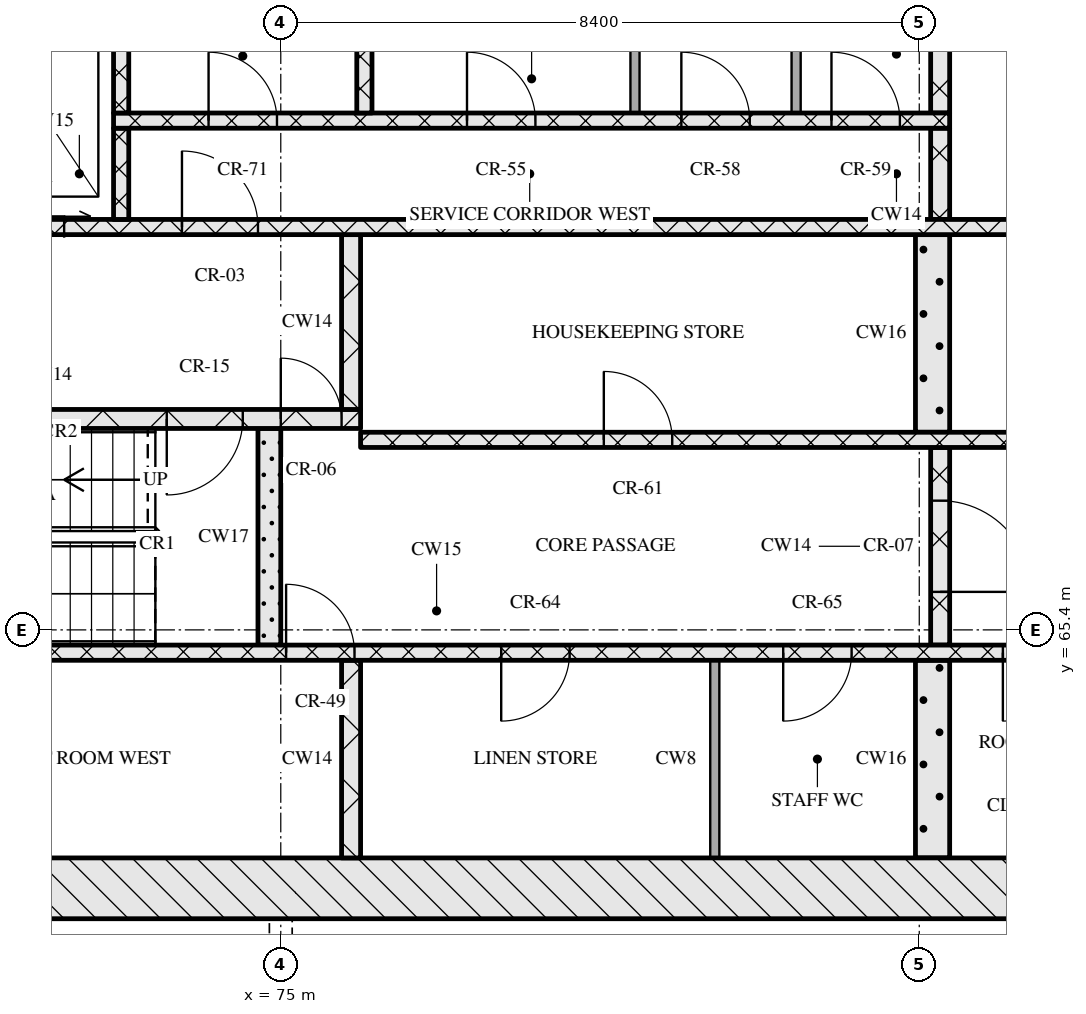
"""IFC4 building model, lengths in metres.
Left out: names, types, materials, properties, quantities, classifications, styles, units other than length and angle.
Written with IfcOpenShell. Run it as: python <this file> out.ifc"""

import sys

from ifc_helpers import new_model, si_unit, direction, frame, frame_2d, origin, place, context, subcontext, project, spatial, rectangle, extrude, element, fill, save


model = new_model("IFC4")
c1 = context("Model", 3, precision=1e-05, world=origin(), true_north=direction((0.0, 1.0)))
c2 = subcontext(c1, "Body", "Model", "MODEL_VIEW")
j1 = project(units=[si_unit("LENGTHUNIT", "METRE"), si_unit("PLANEANGLEUNIT", "RADIAN")], contexts=[c1])
p1 = place(None, origin())
s1 = spatial("IfcSite", under=j1, at=p1, CompositionType="ELEMENT")
p2 = place(p1, origin())
s2 = spatial("IfcBuilding", under=s1, at=p2, CompositionType="ELEMENT")
p3 = place(p2, frame((0.0, 0.0, 158.25)))
s3 = spatial("IfcBuildingStorey", under=s2, at=p3, CompositionType="ELEMENT", Elevation=158.25)
p4 = place(p3, frame((67.0, 62.0, 0.0), z_axis=(0.0, 0.0, 1.0), x_axis=(1.0, 0.0, 0.0)))
e1 = element("IfcWall", 1, at=p4, inside=s3, PredefinedType="SOLIDWALL", context=c2, shape_type="SweptSolid", body=[
    extrude(rectangle(XDim=41.2, YDim=0.8, at=frame_2d((20.6, 0.0))), origin(), (0.0, 0.0, 1.0), 3.32),
])
p5 = place(p4, frame((20.95, 0.0, 0.0)))
e2 = element("IfcOpeningElement", 2, at=p5, cuts=e1, PredefinedType="OPENING", context=c2, shape_type="SweptSolid", body=[
    extrude(rectangle(XDim=1.8, YDim=2.1, at=frame_2d((0.9, 1.05))), frame((0.0, 0.41, 0.0), z_axis=(0.0, -1.0, 0.0), x_axis=(1.0, 0.0, 0.0)), (0.0, 0.0, 1.0), 0.82),
])
p6 = place(p3, frame((75.925, 62.4, 0.0), z_axis=(0.0, 0.0, 1.0), x_axis=(0.0, 1.0, 0.0)))
e3 = element("IfcWall", 3, at=p6, inside=s3, PredefinedType="SOLIDWALL", context=c2, shape_type="SweptSolid", body=[
    extrude(rectangle(XDim=2.6, YDim=0.25, at=frame_2d((1.3, 0.0))), origin(), (0.0, 0.0, 1.0), 3.32),
])
p7 = place(p3, frame((80.71, 62.4, 0.0), z_axis=(0.0, 0.0, 1.0), x_axis=(0.0, 1.0, 0.0)))
e4 = element("IfcWall", 4, at=p7, inside=s3, PredefinedType="PARTITIONING", context=c2, shape_type="SweptSolid", body=[
    extrude(rectangle(XDim=2.6, YDim=0.12, at=frame_2d((1.3, 0.0))), origin(), (0.0, 0.0, 1.0), 3.32),
])
p8 = place(p3, frame((83.575, 62.4, 0.0), z_axis=(0.0, 0.0, 1.0), x_axis=(0.0, 1.0, 0.0)))
e5 = element("IfcWall", 5, at=p8, inside=s3, PredefinedType="SOLIDWALL", context=c2, shape_type="SweptSolid", body=[
    extrude(rectangle(XDim=2.6, YDim=0.45, at=frame_2d((1.3, 0.0))), origin(), (0.0, 0.0, 1.0), 3.32),
])
p9 = place(p3, frame((67.8, 65.1, 0.0), z_axis=(0.0, 0.0, 1.0), x_axis=(1.0, 0.0, 0.0)))
e6 = element("IfcWall", 6, at=p9, inside=s3, PredefinedType="SOLIDWALL", context=c2, shape_type="SweptSolid", body=[
    extrude(rectangle(XDim=18.5, YDim=0.2, at=frame_2d((9.25, 0.0))), origin(), (0.0, 0.0, 1.0), 3.32),
])
p10 = place(p9, frame((7.27, 0.0, 0.0)))
e7 = element("IfcOpeningElement", 7, at=p10, cuts=e6, PredefinedType="OPENING", context=c2, shape_type="SweptSolid", body=[
    extrude(rectangle(XDim=0.9, YDim=2.1, at=frame_2d((0.45, 1.05))), frame((0.0, 0.11, 0.0), z_axis=(0.0, -1.0, 0.0), x_axis=(1.0, 0.0, 0.0)), (0.0, 0.0, 1.0), 0.22),
])
p11 = place(p9, frame((10.1, 0.0, 0.0)))
e8 = element("IfcOpeningElement", 8, at=p11, cuts=e6, PredefinedType="OPENING", context=c2, shape_type="SweptSolid", body=[
    extrude(rectangle(XDim=0.9, YDim=2.1, at=frame_2d((0.45, 1.05))), frame((0.0, 0.11, 0.0), z_axis=(0.0, -1.0, 0.0), x_axis=(1.0, 0.0, 0.0)), (0.0, 0.0, 1.0), 0.22),
])
p12 = place(p9, frame((13.81, 0.0, 0.0)))
e9 = element("IfcOpeningElement", 9, at=p12, cuts=e6, PredefinedType="OPENING", context=c2, shape_type="SweptSolid", body=[
    extrude(rectangle(XDim=0.9, YDim=2.1, at=frame_2d((0.45, 1.05))), frame((0.0, 0.11, 0.0), z_axis=(0.0, -1.0, 0.0), x_axis=(1.0, 0.0, 0.0)), (0.0, 0.0, 1.0), 0.22),
])
p13 = place(p9, frame((16.7, 0.0, 0.0)))
e10 = element("IfcOpeningElement", 10, at=p13, cuts=e6, PredefinedType="OPENING", context=c2, shape_type="SweptSolid", body=[
    extrude(rectangle(XDim=0.9, YDim=2.1, at=frame_2d((0.45, 1.05))), frame((0.0, 0.11, 0.0), z_axis=(0.0, -1.0, 0.0), x_axis=(1.0, 0.0, 0.0)), (0.0, 0.0, 1.0), 0.22),
])
p14 = place(p3, frame((74.85, 65.2, 0.0), z_axis=(0.0, 0.0, 1.0), x_axis=(0.0, 1.0, 0.0)))
e11 = element("IfcWall", 11, at=p14, inside=s3, PredefinedType="SOLIDWALL", context=c2, shape_type="SweptSolid", body=[
    extrude(rectangle(XDim=2.85, YDim=0.3, at=frame_2d((1.425, 0.0))), origin(), (0.0, 0.0, 1.0), 3.32),
])
p15 = place(p3, frame((83.675, 65.2, 0.0), z_axis=(0.0, 0.0, 1.0), x_axis=(0.0, 1.0, 0.0)))
e12 = element("IfcWall", 12, at=p15, inside=s3, PredefinedType="SOLIDWALL", context=c2, shape_type="SweptSolid", body=[
    extrude(rectangle(XDim=2.6, YDim=0.25, at=frame_2d((1.3, 0.0))), origin(), (0.0, 0.0, 1.0), 3.32),
])
p16 = place(p15, frame((0.7, 0.0, 0.0)))
e13 = element("IfcOpeningElement", 13, at=p16, cuts=e12, PredefinedType="OPENING", context=c2, shape_type="SweptSolid", body=[
    extrude(rectangle(XDim=1.2, YDim=2.1, at=frame_2d((0.6, 1.05))), frame((0.0, 0.135, 0.0), z_axis=(0.0, -1.0, 0.0), x_axis=(1.0, 0.0, 0.0)), (0.0, 0.0, 1.0), 0.27),
])
p17 = place(p3, frame((76.05, 67.9, 0.0), z_axis=(0.0, 0.0, 1.0), x_axis=(1.0, 0.0, 0.0)))
e14 = element("IfcWall", 14, at=p17, inside=s3, PredefinedType="SOLIDWALL", context=c2, shape_type="SweptSolid", body=[
    extrude(rectangle(XDim=23.1, YDim=0.2, at=frame_2d((11.55, 0.0))), origin(), (0.0, 0.0, 1.0), 3.32),
])
p18 = place(p17, frame((3.2, 0.0, 0.0)))
e15 = element("IfcOpeningElement", 15, at=p18, cuts=e14, PredefinedType="OPENING", context=c2, shape_type="SweptSolid", body=[
    extrude(rectangle(XDim=0.9, YDim=2.1, at=frame_2d((0.45, 1.05))), frame((0.0, 0.11, 0.0), z_axis=(0.0, -1.0, 0.0), x_axis=(1.0, 0.0, 0.0)), (0.0, 0.0, 1.0), 0.22),
])
p19 = place(p17, frame((9.7, 0.0, 0.0)))
e16 = element("IfcOpeningElement", 16, at=p19, cuts=e14, PredefinedType="OPENING", context=c2, shape_type="SweptSolid", body=[
    extrude(rectangle(XDim=0.9, YDim=2.1, at=frame_2d((0.45, 1.05))), frame((0.0, 0.11, 0.0), z_axis=(0.0, -1.0, 0.0), x_axis=(1.0, 0.0, 0.0)), (0.0, 0.0, 1.0), 0.22),
])
p20 = place(p17, frame((13.55, 0.0, 0.0)))
e17 = element("IfcOpeningElement", 17, at=p20, cuts=e14, PredefinedType="OPENING", context=c2, shape_type="SweptSolid", body=[
    extrude(rectangle(XDim=1.0, YDim=2.1, at=frame_2d((0.5, 1.05))), frame((0.0, 0.11, 0.0), z_axis=(0.0, -1.0, 0.0), x_axis=(1.0, 0.0, 0.0)), (0.0, 0.0, 1.0), 0.22),
])
p21 = place(p17, frame((16.2, 0.0, 0.0)))
e18 = element("IfcOpeningElement", 18, at=p21, cuts=e14, PredefinedType="OPENING", context=c2, shape_type="SweptSolid", body=[
    extrude(rectangle(XDim=1.1, YDim=2.1, at=frame_2d((0.55, 1.05))), frame((0.0, 0.11, 0.0), z_axis=(0.0, -1.0, 0.0), x_axis=(1.0, 0.0, 0.0)), (0.0, 0.0, 1.0), 0.22),
])
p22 = place(p17, frame((18.7, 0.0, 0.0)))
e19 = element("IfcOpeningElement", 19, at=p22, cuts=e14, PredefinedType="OPENING", context=c2, shape_type="SweptSolid", body=[
    extrude(rectangle(XDim=1.1, YDim=2.1, at=frame_2d((0.55, 1.05))), frame((0.0, 0.11, 0.0), z_axis=(0.0, -1.0, 0.0), x_axis=(1.0, 0.0, 0.0)), (0.0, 0.0, 1.0), 0.22),
])
p23 = place(p17, frame((21.2, 0.0, 0.0)))
e20 = element("IfcOpeningElement", 20, at=p23, cuts=e14, PredefinedType="OPENING", context=c2, shape_type="SweptSolid", body=[
    extrude(rectangle(XDim=1.1, YDim=2.1, at=frame_2d((0.55, 1.05))), frame((0.0, 0.11, 0.0), z_axis=(0.0, -1.0, 0.0), x_axis=(1.0, 0.0, 0.0)), (0.0, 0.0, 1.0), 0.22),
])
p24 = place(p3, frame((83.575, 68.0, 0.0), z_axis=(0.0, 0.0, 1.0), x_axis=(0.0, 1.0, 0.0)))
e21 = element("IfcWall", 21, at=p24, inside=s3, PredefinedType="SOLIDWALL", context=c2, shape_type="SweptSolid", body=[
    extrude(rectangle(XDim=2.6, YDim=0.45, at=frame_2d((1.3, 0.0))), origin(), (0.0, 0.0, 1.0), 3.32),
])
p25 = place(p3, frame((67.8, 68.175, 0.0), z_axis=(0.0, 0.0, 1.0), x_axis=(1.0, 0.0, 0.0)))
e22 = element("IfcWall", 22, at=p25, inside=s3, PredefinedType="SOLIDWALL", context=c2, shape_type="SweptSolid", body=[
    extrude(rectangle(XDim=8.25, YDim=0.25, at=frame_2d((4.125, 0.0))), origin(), (0.0, 0.0, 1.0), 3.32),
])
p26 = place(p25, frame((5.7, 0.0, 0.0)))
e23 = element("IfcOpeningElement", 23, at=p26, cuts=e22, PredefinedType="OPENING", context=c2, shape_type="SweptSolid", body=[
    extrude(rectangle(XDim=1.0, YDim=2.1, at=frame_2d((0.5, 1.05))), frame((0.0, 0.135, 0.0), z_axis=(0.0, -1.0, 0.0), x_axis=(1.0, 0.0, 0.0)), (0.0, 0.0, 1.0), 0.27),
])
p27 = place(p25, frame((7.2, 0.0, 0.0)))
e24 = element("IfcOpeningElement", 24, at=p27, cuts=e22, PredefinedType="OPENING", context=c2, shape_type="SweptSolid", body=[
    extrude(rectangle(XDim=0.8, YDim=2.1, at=frame_2d((0.4, 1.05))), frame((0.0, 0.135, 0.0), z_axis=(0.0, -1.0, 0.0), x_axis=(1.0, 0.0, 0.0)), (0.0, 0.0, 1.0), 0.27),
])
p28 = place(p3, frame((75.925, 68.3, 0.0), z_axis=(0.0, 0.0, 1.0), x_axis=(0.0, 1.0, 0.0)))
e25 = element("IfcWall", 25, at=p28, inside=s3, PredefinedType="SOLIDWALL", context=c2, shape_type="SweptSolid", body=[
    extrude(rectangle(XDim=2.3, YDim=0.25, at=frame_2d((1.15, 0.0))), origin(), (0.0, 0.0, 1.0), 3.32),
])
p29 = place(p3, frame((67.8, 70.7, 0.0), z_axis=(0.0, 0.0, 1.0), x_axis=(1.0, 0.0, 0.0)))
e26 = element("IfcWall", 26, at=p29, inside=s3, PredefinedType="SOLIDWALL", context=c2, shape_type="SweptSolid", body=[
    extrude(rectangle(XDim=39.6, YDim=0.2, at=frame_2d((19.8, 0.0))), origin(), (0.0, 0.0, 1.0), 3.32),
])
p30 = place(p29, frame((0.65, 0.0, 0.0)))
e27 = element("IfcOpeningElement", 27, at=p30, cuts=e26, PredefinedType="OPENING", context=c2, shape_type="SweptSolid", body=[
    extrude(rectangle(XDim=1.1, YDim=2.1, at=frame_2d((0.55, 1.05))), frame((0.0, 0.11, 0.0), z_axis=(0.0, -1.0, 0.0), x_axis=(1.0, 0.0, 0.0)), (0.0, 0.0, 1.0), 0.22),
])
p31 = place(p29, frame((3.25, 0.0, 0.0)))
e28 = element("IfcOpeningElement", 28, at=p31, cuts=e26, PredefinedType="OPENING", context=c2, shape_type="SweptSolid", body=[
    extrude(rectangle(XDim=1.1, YDim=2.1, at=frame_2d((0.55, 1.05))), frame((0.0, 0.11, 0.0), z_axis=(0.0, -1.0, 0.0), x_axis=(1.0, 0.0, 0.0)), (0.0, 0.0, 1.0), 0.22),
])
p32 = place(p29, frame((5.9, 0.0, 0.0)))
e29 = element("IfcOpeningElement", 29, at=p32, cuts=e26, PredefinedType="OPENING", context=c2, shape_type="SweptSolid", body=[
    extrude(rectangle(XDim=1.0, YDim=2.1, at=frame_2d((0.5, 1.05))), frame((0.0, 0.11, 0.0), z_axis=(0.0, -1.0, 0.0), x_axis=(1.0, 0.0, 0.0)), (0.0, 0.0, 1.0), 0.22),
])
p33 = place(p29, frame((21.7, 0.0, 0.0)))
e30 = element("IfcOpeningElement", 30, at=p33, cuts=e26, PredefinedType="OPENING", context=c2, shape_type="SweptSolid", body=[
    extrude(rectangle(XDim=1.0, YDim=2.1, at=frame_2d((0.5, 1.05))), frame((0.0, 0.11, 0.0), z_axis=(0.0, -1.0, 0.0), x_axis=(1.0, 0.0, 0.0)), (0.0, 0.0, 1.0), 0.22),
])
p34 = place(p29, frame((32.7, 0.0, 0.0)))
e31 = element("IfcOpeningElement", 31, at=p34, cuts=e26, PredefinedType="OPENING", context=c2, shape_type="SweptSolid", body=[
    extrude(rectangle(XDim=1.0, YDim=2.1, at=frame_2d((0.5, 1.05))), frame((0.0, 0.11, 0.0), z_axis=(0.0, -1.0, 0.0), x_axis=(1.0, 0.0, 0.0)), (0.0, 0.0, 1.0), 0.22),
])
p35 = place(p29, frame((35.25, 0.0, 0.0)))
e32 = element("IfcOpeningElement", 32, at=p35, cuts=e26, PredefinedType="OPENING", context=c2, shape_type="SweptSolid", body=[
    extrude(rectangle(XDim=1.1, YDim=2.1, at=frame_2d((0.55, 1.05))), frame((0.0, 0.11, 0.0), z_axis=(0.0, -1.0, 0.0), x_axis=(1.0, 0.0, 0.0)), (0.0, 0.0, 1.0), 0.22),
])
p36 = place(p29, frame((37.85, 0.0, 0.0)))
e33 = element("IfcOpeningElement", 33, at=p36, cuts=e26, PredefinedType="OPENING", context=c2, shape_type="SweptSolid", body=[
    extrude(rectangle(XDim=1.1, YDim=2.1, at=frame_2d((0.55, 1.05))), frame((0.0, 0.11, 0.0), z_axis=(0.0, -1.0, 0.0), x_axis=(1.0, 0.0, 0.0)), (0.0, 0.0, 1.0), 0.22),
])
p37 = place(p3, frame((72.9, 70.8, 0.0), z_axis=(0.0, 0.0, 1.0), x_axis=(0.0, 1.0, 0.0)))
e34 = element("IfcWall", 34, at=p37, inside=s3, PredefinedType="SOLIDWALL", context=c2, shape_type="SweptSolid", body=[
    extrude(rectangle(XDim=1.2, YDim=0.2, at=frame_2d((0.6, 0.0))), origin(), (0.0, 0.0, 1.0), 3.32),
])
p38 = place(p3, frame((83.675, 70.8, 0.0), z_axis=(0.0, 0.0, 1.0), x_axis=(0.0, 1.0, 0.0)))
e35 = element("IfcWall", 35, at=p38, inside=s3, PredefinedType="SOLIDWALL", context=c2, shape_type="SweptSolid", body=[
    extrude(rectangle(XDim=1.2, YDim=0.25, at=frame_2d((0.6, 0.0))), origin(), (0.0, 0.0, 1.0), 3.32),
])
p39 = place(p3, frame((72.8, 72.1, 0.0), z_axis=(0.0, 0.0, 1.0), x_axis=(1.0, 0.0, 0.0)))
e36 = element("IfcWall", 36, at=p39, inside=s3, PredefinedType="SOLIDWALL", context=c2, shape_type="SweptSolid", body=[
    extrude(rectangle(XDim=11.0, YDim=0.2, at=frame_2d((5.5, 0.0))), origin(), (0.0, 0.0, 1.0), 3.32),
])
p40 = place(p39, frame((1.25, 0.0, 0.0)))
e37 = element("IfcOpeningElement", 37, at=p40, cuts=e36, PredefinedType="OPENING", context=c2, shape_type="SweptSolid", body=[
    extrude(rectangle(XDim=0.9, YDim=2.1, at=frame_2d((0.45, 1.05))), frame((0.0, 0.11, 0.0), z_axis=(0.0, -1.0, 0.0), x_axis=(1.0, 0.0, 0.0)), (0.0, 0.0, 1.0), 0.22),
])
p41 = place(p39, frame((4.65, 0.0, 0.0)))
e38 = element("IfcOpeningElement", 38, at=p41, cuts=e36, PredefinedType="OPENING", context=c2, shape_type="SweptSolid", body=[
    extrude(rectangle(XDim=0.9, YDim=2.1, at=frame_2d((0.45, 1.05))), frame((0.0, 0.11, 0.0), z_axis=(0.0, -1.0, 0.0), x_axis=(1.0, 0.0, 0.0)), (0.0, 0.0, 1.0), 0.22),
])
p42 = place(p39, frame((7.47, 0.0, 0.0)))
e39 = element("IfcOpeningElement", 39, at=p42, cuts=e36, PredefinedType="OPENING", context=c2, shape_type="SweptSolid", body=[
    extrude(rectangle(XDim=0.9, YDim=2.1, at=frame_2d((0.45, 1.05))), frame((0.0, 0.11, 0.0), z_axis=(0.0, -1.0, 0.0), x_axis=(1.0, 0.0, 0.0)), (0.0, 0.0, 1.0), 0.22),
])
p43 = place(p39, frame((9.445, 0.0, 0.0)))
e40 = element("IfcOpeningElement", 40, at=p43, cuts=e36, PredefinedType="OPENING", context=c2, shape_type="SweptSolid", body=[
    extrude(rectangle(XDim=0.9, YDim=2.1, at=frame_2d((0.45, 1.05))), frame((0.0, 0.11, 0.0), z_axis=(0.0, -1.0, 0.0), x_axis=(1.0, 0.0, 0.0)), (0.0, 0.0, 1.0), 0.22),
])
for number, where, z_axis, x_axis in (
    (41, (72.9, 72.2, 0.0), (0.0, 0.0, 1.0), (0.0, 1.0, 0.0)),
    (42, (76.1, 72.2, 0.0), (0.0, 0.0, 1.0), (0.0, 1.0, 0.0)),
):
    element("IfcWall", number, at=place(p3, frame(where, z_axis=z_axis, x_axis=x_axis)), inside=s3, PredefinedType="SOLIDWALL", context=c2, shape_type="SweptSolid", body=[
        extrude(rectangle(XDim=2.2, YDim=0.2, at=frame_2d((1.1, 0.0))), origin(), (0.0, 0.0, 1.0), 3.32),
    ])
for number, where, z_axis, x_axis in (
    (43, (79.66, 72.2, 0.0), (0.0, 0.0, 1.0), (0.0, 1.0, 0.0)),
    (44, (81.78, 72.2, 0.0), (0.0, 0.0, 1.0), (0.0, 1.0, 0.0)),
):
    element("IfcWall", number, at=place(p3, frame(where, z_axis=z_axis, x_axis=x_axis)), inside=s3, PredefinedType="PARTITIONING", context=c2, shape_type="SweptSolid", body=[
        extrude(rectangle(XDim=2.2, YDim=0.12, at=frame_2d((1.1, 0.0))), origin(), (0.0, 0.0, 1.0), 3.32),
    ])
p44 = place(p3, frame((83.675, 72.2, 0.0), z_axis=(0.0, 0.0, 1.0), x_axis=(0.0, 1.0, 0.0)))
e45 = element("IfcWall", 45, at=p44, inside=s3, PredefinedType="SOLIDWALL", context=c2, shape_type="SweptSolid", body=[
    extrude(rectangle(XDim=1.55, YDim=0.25, at=frame_2d((0.775, 0.0))), origin(), (0.0, 0.0, 1.0), 3.32),
])
p45 = place(p10, origin())
e46 = element("IfcDoor", 46, at=p45, inside=s3, OperationType="SINGLE_SWING_LEFT", PredefinedType="DOOR", context=c2, shape_type="SweptSolid", body=[
    extrude(rectangle(XDim=0.9, YDim=2.1, at=frame_2d((0.45, 1.05))), frame((0.0, 0.025, 0.0), z_axis=(0.0, -1.0, 0.0), x_axis=(1.0, 0.0, 0.0)), (0.0, 0.0, 1.0), 0.05),
])
fill(e7, e46)
p46 = place(p11, origin())
e47 = element("IfcDoor", 47, at=p46, inside=s3, OperationType="SINGLE_SWING_RIGHT", PredefinedType="DOOR", context=c2, shape_type="SweptSolid", body=[
    extrude(rectangle(XDim=0.9, YDim=2.1, at=frame_2d((0.45, 1.05))), frame((0.0, 0.025, 0.0), z_axis=(0.0, -1.0, 0.0), x_axis=(1.0, 0.0, 0.0)), (0.0, 0.0, 1.0), 0.05),
])
fill(e8, e47)
p47 = place(p12, origin())
e48 = element("IfcDoor", 48, at=p47, inside=s3, OperationType="SINGLE_SWING_RIGHT", PredefinedType="DOOR", context=c2, shape_type="SweptSolid", body=[
    extrude(rectangle(XDim=0.9, YDim=2.1, at=frame_2d((0.45, 1.05))), frame((0.0, 0.025, 0.0), z_axis=(0.0, -1.0, 0.0), x_axis=(1.0, 0.0, 0.0)), (0.0, 0.0, 1.0), 0.05),
])
fill(e9, e48)
p48 = place(p13, origin())
e49 = element("IfcDoor", 49, at=p48, inside=s3, OperationType="SINGLE_SWING_RIGHT", PredefinedType="DOOR", context=c2, shape_type="SweptSolid", body=[
    extrude(rectangle(XDim=0.9, YDim=2.1, at=frame_2d((0.45, 1.05))), frame((0.0, 0.025, 0.0), z_axis=(0.0, -1.0, 0.0), x_axis=(1.0, 0.0, 0.0)), (0.0, 0.0, 1.0), 0.05),
])
fill(e10, e49)
p49 = place(p16, origin())
e50 = element("IfcDoor", 50, at=p49, inside=s3, OperationType="SINGLE_SWING_RIGHT", PredefinedType="DOOR", context=c2, shape_type="SweptSolid", body=[
    extrude(rectangle(XDim=1.2, YDim=2.1, at=frame_2d((0.6, 1.05))), frame((0.0, 0.025, 0.0), z_axis=(0.0, -1.0, 0.0), x_axis=(1.0, 0.0, 0.0)), (0.0, 0.0, 1.0), 0.05),
])
fill(e13, e50)
p50 = place(p18, origin())
e51 = element("IfcDoor", 51, at=p50, inside=s3, OperationType="SINGLE_SWING_LEFT", PredefinedType="DOOR", context=c2, shape_type="SweptSolid", body=[
    extrude(rectangle(XDim=0.9, YDim=2.1, at=frame_2d((0.45, 1.05))), frame((0.0, 0.025, 0.0), z_axis=(0.0, -1.0, 0.0), x_axis=(1.0, 0.0, 0.0)), (0.0, 0.0, 1.0), 0.05),
])
fill(e15, e51)
p51 = place(p26, origin())
e52 = element("IfcDoor", 52, at=p51, inside=s3, OperationType="SINGLE_SWING_RIGHT", PredefinedType="DOOR", context=c2, shape_type="SweptSolid", body=[
    extrude(rectangle(XDim=1.0, YDim=2.1, at=frame_2d((0.5, 1.05))), frame((0.0, 0.025, 0.0), z_axis=(0.0, -1.0, 0.0), x_axis=(1.0, 0.0, 0.0)), (0.0, 0.0, 1.0), 0.05),
])
fill(e23, e52)
p52 = place(p27, origin())
e53 = element("IfcDoor", 53, at=p52, inside=s3, OperationType="SINGLE_SWING_LEFT", PredefinedType="DOOR", context=c2, shape_type="SweptSolid", body=[
    extrude(rectangle(XDim=0.8, YDim=2.1, at=frame_2d((0.4, 1.05))), frame((0.0, 0.025, 0.0), z_axis=(0.0, -1.0, 0.0), x_axis=(1.0, 0.0, 0.0)), (0.0, 0.0, 1.0), 0.05),
])
fill(e24, e53)
p53 = place(p31, origin())
e54 = element("IfcDoor", 54, at=p53, inside=s3, OperationType="SLIDING_TO_RIGHT", PredefinedType="DOOR", context=c2, shape_type="SweptSolid", body=[
    extrude(rectangle(XDim=1.1, YDim=2.1, at=frame_2d((0.55, 1.05))), frame((0.0, 0.025, 0.0), z_axis=(0.0, -1.0, 0.0), x_axis=(1.0, 0.0, 0.0)), (0.0, 0.0, 1.0), 0.05),
])
fill(e28, e54)
p54 = place(p32, origin())
e55 = element("IfcDoor", 55, at=p54, inside=s3, OperationType="SINGLE_SWING_LEFT", PredefinedType="DOOR", context=c2, shape_type="SweptSolid", body=[
    extrude(rectangle(XDim=1.0, YDim=2.1, at=frame_2d((0.5, 1.05))), frame((0.0, 0.025, 0.0), z_axis=(0.0, -1.0, 0.0), x_axis=(1.0, 0.0, 0.0)), (0.0, 0.0, 1.0), 0.05),
])
fill(e29, e55)
p55 = place(p40, origin())
e56 = element("IfcDoor", 56, at=p55, inside=s3, OperationType="SINGLE_SWING_LEFT", PredefinedType="DOOR", context=c2, shape_type="SweptSolid", body=[
    extrude(rectangle(XDim=0.9, YDim=2.1, at=frame_2d((0.45, 1.05))), frame((0.0, 0.025, 0.0), z_axis=(0.0, -1.0, 0.0), x_axis=(1.0, 0.0, 0.0)), (0.0, 0.0, 1.0), 0.05),
])
fill(e37, e56)
p56 = place(p41, origin())
e57 = element("IfcDoor", 57, at=p56, inside=s3, OperationType="SINGLE_SWING_LEFT", PredefinedType="DOOR", context=c2, shape_type="SweptSolid", body=[
    extrude(rectangle(XDim=0.9, YDim=2.1, at=frame_2d((0.45, 1.05))), frame((0.0, 0.025, 0.0), z_axis=(0.0, -1.0, 0.0), x_axis=(1.0, 0.0, 0.0)), (0.0, 0.0, 1.0), 0.05),
])
fill(e38, e57)
p57 = place(p42, origin())
e58 = element("IfcDoor", 58, at=p57, inside=s3, OperationType="SINGLE_SWING_LEFT", PredefinedType="DOOR", context=c2, shape_type="SweptSolid", body=[
    extrude(rectangle(XDim=0.9, YDim=2.1, at=frame_2d((0.45, 1.05))), frame((0.0, 0.025, 0.0), z_axis=(0.0, -1.0, 0.0), x_axis=(1.0, 0.0, 0.0)), (0.0, 0.0, 1.0), 0.05),
])
fill(e39, e58)
p58 = place(p43, origin())
e59 = element("IfcDoor", 59, at=p58, inside=s3, OperationType="SINGLE_SWING_LEFT", PredefinedType="DOOR", context=c2, shape_type="SweptSolid", body=[
    extrude(rectangle(XDim=0.9, YDim=2.1, at=frame_2d((0.45, 1.05))), frame((0.0, 0.025, 0.0), z_axis=(0.0, -1.0, 0.0), x_axis=(1.0, 0.0, 0.0)), (0.0, 0.0, 1.0), 0.05),
])
fill(e40, e59)
save(model, sys.argv[1])
